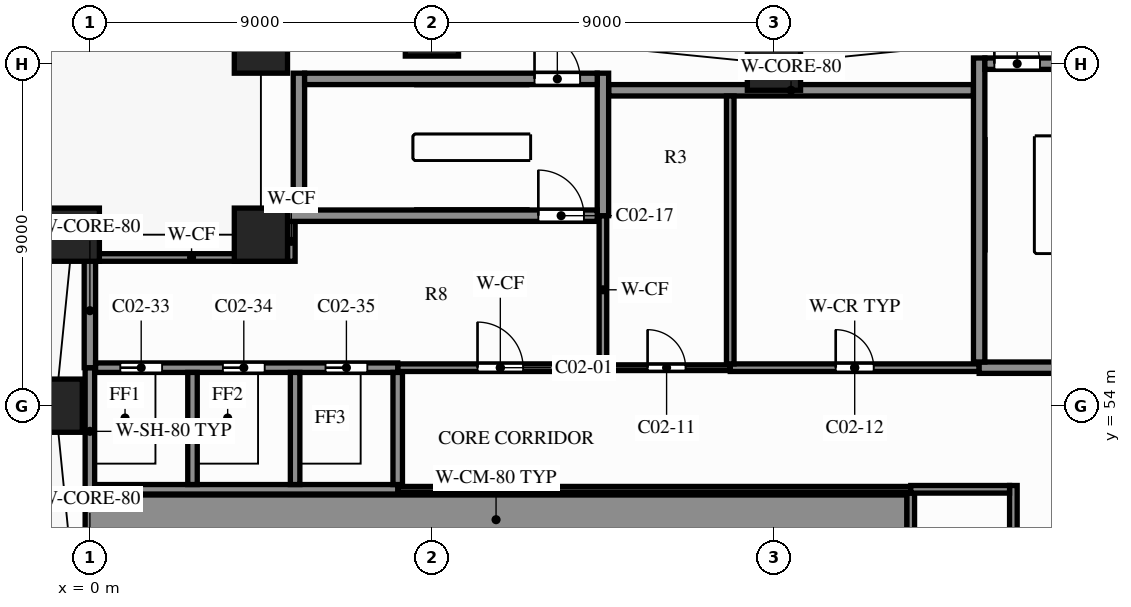
"""IFC4 building model, lengths in metres.
Left out: names, types, materials, properties, quantities, classifications, styles, units other than length and angle.
Written with IfcOpenShell. Run it as: python <this file> out.ifc"""

import sys

from ifc_helpers import new_model, si_unit, direction, frame, frame_2d, origin, origin_2d, place, context, subcontext, project, spatial, rectangle, extrude, element, fill, save


model = new_model("IFC4")
c1 = context("Model", 3, precision=1e-05, world=origin(), true_north=direction((0.0, 1.0)))
c2 = subcontext(c1, "Body", "Model", "MODEL_VIEW")
j1 = project(units=[si_unit("LENGTHUNIT", "METRE"), si_unit("PLANEANGLEUNIT", "RADIAN")], contexts=[c1])
p1 = place(None, origin())
s1 = spatial("IfcSite", under=j1, at=p1, CompositionType="ELEMENT")
p2 = place(p1, origin())
s2 = spatial("IfcBuilding", under=s1, at=p2, CompositionType="ELEMENT")
p3 = place(p2, origin())
s3 = spatial("IfcBuildingStorey", under=s2, at=p3, CompositionType="ELEMENT", Elevation=0.0)
for number, where, z_axis, x_axis in (
    (1, (18.0, 63.0, 0.0), (0.0, 0.0, 1.0), (1.0, 0.0, 0.0)),
    (2, (9.0, 63.9, 0.0), (0.0, 0.0, 1.0), (1.0, 0.0, 0.0)),
    (3, (4.5, 63.45, 0.0), (0.0, 0.0, 1.0), (1.0, 0.0, 0.0)),
    (4, (-0.45, 58.5, 0.0), (0.0, 0.0, 1.0), (1.0, 0.0, 0.0)),
    (5, (-0.9, 54.0, 0.0), (0.0, 0.0, 1.0), (1.0, 0.0, 0.0)),
    (6, (4.5, 58.5, 0.0), (0.0, 0.0, 1.0), (1.0, 0.0, 0.0)),
):
    element("IfcColumn", number, at=place(p3, frame(where, z_axis=z_axis, x_axis=x_axis)), inside=s3, PredefinedType="COLUMN", context=c2, shape_type="SweptSolid", body=[
        extrude(rectangle(XDim=1.4, YDim=1.4, at=origin_2d()), origin(), (0.0, 0.0, 1.0), 7.5),
    ])
p4 = place(p3, frame((-0.125, 51.0, 0.0), z_axis=(0.0, 0.0, 1.0), x_axis=(1.0, 0.0, 0.0)))
e7 = element("IfcWall", 7, at=p4, inside=s3, PredefinedType="SHEAR", context=c2, shape_type="SweptSolid", body=[
    extrude(rectangle(XDim=21.625, YDim=1.3, at=frame_2d((10.812, 0.0))), origin(), (0.0, 0.0, 1.0), 7.2),
])
p5 = place(p3, frame((8.1, 51.8, 0.0), z_axis=(0.0, 0.0, 1.0), x_axis=(1.0, 0.0, 0.0)))
e8 = element("IfcWall", 8, at=p5, inside=s3, PredefinedType="PARTITIONING", context=c2, shape_type="SweptSolid", body=[
    extrude(rectangle(XDim=13.5, YDim=0.15, at=frame_2d((6.75, 0.0))), origin(), (0.0, 0.0, 1.0), 7.2),
])
p6 = place(p3, frame((21.6, 51.8, 0.0), z_axis=(0.0, 0.0, 1.0), x_axis=(1.0, 0.0, 0.0)))
e9 = element("IfcWall", 9, at=p6, inside=s3, PredefinedType="PARTITIONING", context=c2, shape_type="SweptSolid", body=[
    extrude(rectangle(XDim=2.6, YDim=0.2, at=frame_2d((1.3, 0.0))), origin(), (0.0, 0.0, 1.0), 7.2),
])
p7 = place(p3, frame((0.125, 51.8, 0.0), z_axis=(0.0, 0.0, 1.0), x_axis=(1.0, 0.0, 0.0)))
e10 = element("IfcWall", 10, at=p7, inside=s3, PredefinedType="SHEAR", context=c2, shape_type="SweptSolid", body=[
    extrude(rectangle(XDim=7.975, YDim=0.25, at=frame_2d((3.988, 0.0))), origin(), (0.0, 0.0, 1.0), 7.2),
])
p8 = place(p3, frame((8.1, 55.0, 0.0), z_axis=(0.0, 0.0, 1.0), x_axis=(1.0, 0.0, 0.0)))
e11 = element("IfcWall", 11, at=p8, inside=s3, PredefinedType="PARTITIONING", context=c2, shape_type="SweptSolid", body=[
    extrude(rectangle(XDim=5.4, YDim=0.2, at=frame_2d((2.7, 0.0))), origin(), (0.0, 0.0, 1.0), 7.2),
])
p9 = place(p8, frame((2.1, 0.0, 0.0)))
e12 = element("IfcOpeningElement", 12, at=p9, cuts=e11, PredefinedType="OPENING", context=c2, shape_type="SweptSolid", body=[
    extrude(rectangle(XDim=1.2, YDim=2.2, at=frame_2d((0.6, 1.1))), frame((0.0, 0.11, 0.0), z_axis=(0.0, -1.0, 0.0), x_axis=(1.0, 0.0, 0.0)), (0.0, 0.0, 1.0), 0.22),
])
p10 = place(p3, frame((13.5, 55.0, 0.0), z_axis=(0.0, 0.0, 1.0), x_axis=(1.0, 0.0, 0.0)))
e13 = element("IfcWall", 13, at=p10, inside=s3, PredefinedType="PARTITIONING", context=c2, shape_type="SweptSolid", body=[
    extrude(rectangle(XDim=3.35, YDim=0.15, at=frame_2d((1.675, 0.0))), origin(), (0.0, 0.0, 1.0), 7.2),
])
p11 = place(p10, frame((1.175, 0.0, 0.0)))
e14 = element("IfcOpeningElement", 14, at=p11, cuts=e13, PredefinedType="OPENING", context=c2, shape_type="SweptSolid", body=[
    extrude(rectangle(XDim=1.0, YDim=2.1, at=frame_2d((0.5, 1.05))), frame((0.0, 0.085, 0.0), z_axis=(0.0, -1.0, 0.0), x_axis=(1.0, 0.0, 0.0)), (0.0, 0.0, 1.0), 0.17),
])
p12 = place(p3, frame((16.85, 55.0, 0.0), z_axis=(0.0, 0.0, 1.0), x_axis=(1.0, 0.0, 0.0)))
e15 = element("IfcWall", 15, at=p12, inside=s3, PredefinedType="PARTITIONING", context=c2, shape_type="SweptSolid", body=[
    extrude(rectangle(XDim=6.55, YDim=0.2, at=frame_2d((3.275, 0.0))), origin(), (0.0, 0.0, 1.0), 7.2),
])
p13 = place(p12, frame((2.775, 0.0, 0.0)))
e16 = element("IfcOpeningElement", 16, at=p13, cuts=e15, PredefinedType="OPENING", context=c2, shape_type="SweptSolid", body=[
    extrude(rectangle(XDim=1.0, YDim=2.1, at=frame_2d((0.5, 1.05))), frame((0.0, 0.11, 0.0), z_axis=(0.0, -1.0, 0.0), x_axis=(1.0, 0.0, 0.0)), (0.0, 0.0, 1.0), 0.22),
])
p14 = place(p3, frame((0.15, 55.0, 0.0), z_axis=(0.0, 0.0, 1.0), x_axis=(1.0, 0.0, 0.0)))
e17 = element("IfcWall", 17, at=p14, inside=s3, PredefinedType="SHEAR", context=c2, shape_type="SweptSolid", body=[
    extrude(rectangle(XDim=7.95, YDim=0.25, at=frame_2d((3.975, 0.0))), origin(), (0.0, 0.0, 1.0), 7.2),
])
p15 = place(p14, frame((0.65, 0.0, 0.0)))
e18 = element("IfcOpeningElement", 18, at=p15, cuts=e17, PredefinedType="OPENING", context=c2, shape_type="SweptSolid", body=[
    extrude(rectangle(XDim=1.1, YDim=2.1, at=frame_2d((0.55, 1.05))), frame((0.0, 0.135, 0.0), z_axis=(0.0, -1.0, 0.0), x_axis=(1.0, 0.0, 0.0)), (0.0, 0.0, 1.0), 0.27),
])
p16 = place(p14, frame((3.35, 0.0, 0.0)))
e19 = element("IfcOpeningElement", 19, at=p16, cuts=e17, PredefinedType="OPENING", context=c2, shape_type="SweptSolid", body=[
    extrude(rectangle(XDim=1.1, YDim=2.1, at=frame_2d((0.55, 1.05))), frame((0.0, 0.135, 0.0), z_axis=(0.0, -1.0, 0.0), x_axis=(1.0, 0.0, 0.0)), (0.0, 0.0, 1.0), 0.27),
])
p17 = place(p14, frame((6.05, 0.0, 0.0)))
e20 = element("IfcOpeningElement", 20, at=p17, cuts=e17, PredefinedType="OPENING", context=c2, shape_type="SweptSolid", body=[
    extrude(rectangle(XDim=1.1, YDim=2.1, at=frame_2d((0.55, 1.05))), frame((0.0, 0.135, 0.0), z_axis=(0.0, -1.0, 0.0), x_axis=(1.0, 0.0, 0.0)), (0.0, 0.0, 1.0), 0.27),
])
p18 = place(p3, frame((23.4, 55.0, 0.0), z_axis=(0.0, 0.0, 1.0), x_axis=(1.0, 0.0, 0.0)))
e21 = element("IfcWall", 21, at=p18, inside=s3, PredefinedType="SHEAR", context=c2, shape_type="SweptSolid", body=[
    extrude(rectangle(XDim=3.45, YDim=0.3, at=frame_2d((1.725, 0.0))), origin(), (0.0, 0.0, 1.0), 7.2),
])
p19 = place(p3, frame((0.15, 57.9, 0.0), z_axis=(0.0, 0.0, 1.0), x_axis=(1.0, 0.0, 0.0)))
e22 = element("IfcWall", 22, at=p19, inside=s3, PredefinedType="PARTITIONING", context=c2, shape_type="SweptSolid", body=[
    extrude(rectangle(XDim=5.05, YDim=0.2, at=frame_2d((2.525, 0.0))), origin(), (0.0, 0.0, 1.0), 7.2),
])
p20 = place(p3, frame((5.2, 59.0, 0.0), z_axis=(0.0, 0.0, 1.0), x_axis=(1.0, 0.0, 0.0)))
e23 = element("IfcWall", 23, at=p20, inside=s3, PredefinedType="SHEAR", context=c2, shape_type="SweptSolid", body=[
    extrude(rectangle(XDim=8.15, YDim=0.3, at=frame_2d((4.075, 0.0))), origin(), (0.0, 0.0, 1.0), 7.2),
])
p21 = place(p20, frame((6.6, 0.0, 0.0)))
e24 = element("IfcOpeningElement", 24, at=p21, cuts=e23, PredefinedType="OPENING", context=c2, shape_type="SweptSolid", body=[
    extrude(rectangle(XDim=1.2, YDim=2.2, at=frame_2d((0.6, 1.1))), frame((0.0, 0.16, 0.0), z_axis=(0.0, -1.0, 0.0), x_axis=(1.0, 0.0, 0.0)), (0.0, 0.0, 1.0), 0.32),
])
p22 = place(p3, frame((13.65, 62.3, 0.0), z_axis=(0.0, 0.0, 1.0), x_axis=(1.0, 0.0, 0.0)))
e25 = element("IfcWall", 25, at=p22, inside=s3, PredefinedType="SHEAR", context=c2, shape_type="SweptSolid", body=[
    extrude(rectangle(XDim=9.6, YDim=0.3, at=frame_2d((4.8, 0.0))), origin(), (0.0, 0.0, 1.0), 7.2),
])
p23 = place(p3, frame((5.65, 62.6, 0.0), z_axis=(0.0, 0.0, 1.0), x_axis=(1.0, 0.0, 0.0)))
e26 = element("IfcWall", 26, at=p23, inside=s3, PredefinedType="SHEAR", context=c2, shape_type="SweptSolid", body=[
    extrude(rectangle(XDim=7.7, YDim=0.3, at=frame_2d((3.85, 0.0))), origin(), (0.0, 0.0, 1.0), 7.2),
])
p24 = place(p23, frame((6.05, 0.0, 0.0)))
e27 = element("IfcOpeningElement", 27, at=p24, cuts=e26, PredefinedType="OPENING", context=c2, shape_type="SweptSolid", body=[
    extrude(rectangle(XDim=1.2, YDim=2.2, at=frame_2d((0.6, 1.1))), frame((0.0, 0.16, 0.0), z_axis=(0.0, -1.0, 0.0), x_axis=(1.0, 0.0, 0.0)), (0.0, 0.0, 1.0), 0.32),
])
p25 = place(p3, frame((23.55, 63.0, 0.0), z_axis=(0.0, 0.0, 1.0), x_axis=(1.0, 0.0, 0.0)))
e28 = element("IfcWall", 28, at=p25, inside=s3, PredefinedType="SHEAR", context=c2, shape_type="SweptSolid", body=[
    extrude(rectangle(XDim=3.3, YDim=0.3, at=frame_2d((1.65, 0.0))), origin(), (0.0, 0.0, 1.0), 7.2),
])
p26 = place(p25, frame((0.25, 0.0, 0.0)))
e29 = element("IfcOpeningElement", 29, at=p26, cuts=e28, PredefinedType="OPENING", context=c2, shape_type="SweptSolid", body=[
    extrude(rectangle(XDim=1.2, YDim=2.2, at=frame_2d((0.6, 1.1))), frame((0.0, 0.16, 0.0), z_axis=(0.0, -1.0, 0.0), x_axis=(1.0, 0.0, 0.0)), (0.0, 0.0, 1.0), 0.32),
])
p27 = place(p3, frame((0.0, 55.0, 0.0), z_axis=(0.0, 0.0, 1.0), x_axis=(0.0, 1.0, 0.0)))
e30 = element("IfcWall", 30, at=p27, inside=s3, PredefinedType="SHEAR", context=c2, shape_type="SweptSolid", body=[
    extrude(rectangle(XDim=3.0, YDim=0.3, at=frame_2d((1.5, 0.0))), origin(), (0.0, 0.0, 1.0), 7.2),
])
p28 = place(p3, frame((0.0, 51.65, 0.0), z_axis=(0.0, 0.0, 1.0), x_axis=(0.0, 1.0, 0.0)))
e31 = element("IfcWall", 31, at=p28, inside=s3, PredefinedType="SHEAR", context=c2, shape_type="SweptSolid", body=[
    extrude(rectangle(XDim=3.35, YDim=0.25, at=frame_2d((1.675, 0.0))), origin(), (0.0, 0.0, 1.0), 7.2),
])
p29 = place(p3, frame((2.7, 51.925, 0.0), z_axis=(0.0, 0.0, 1.0), x_axis=(0.0, 1.0, 0.0)))
e32 = element("IfcWall", 32, at=p29, inside=s3, PredefinedType="SHEAR", context=c2, shape_type="SweptSolid", body=[
    extrude(rectangle(XDim=2.95, YDim=0.25, at=frame_2d((1.475, 0.0))), origin(), (0.0, 0.0, 1.0), 7.2),
])
p30 = place(p3, frame((5.3, 57.8, 0.0), z_axis=(0.0, 0.0, 1.0), x_axis=(0.0, 1.0, 0.0)))
e33 = element("IfcWall", 33, at=p30, inside=s3, PredefinedType="PARTITIONING", context=c2, shape_type="SweptSolid", body=[
    extrude(rectangle(XDim=1.05, YDim=0.2, at=frame_2d((0.525, 0.0))), origin(), (0.0, 0.0, 1.0), 7.2),
])
p31 = place(p3, frame((5.4, 51.925, 0.0), z_axis=(0.0, 0.0, 1.0), x_axis=(0.0, 1.0, 0.0)))
e34 = element("IfcWall", 34, at=p31, inside=s3, PredefinedType="SHEAR", context=c2, shape_type="SweptSolid", body=[
    extrude(rectangle(XDim=2.95, YDim=0.25, at=frame_2d((1.475, 0.0))), origin(), (0.0, 0.0, 1.0), 7.2),
])
p32 = place(p3, frame((5.5, 59.15, 0.0), z_axis=(0.0, 0.0, 1.0), x_axis=(0.0, 1.0, 0.0)))
e35 = element("IfcWall", 35, at=p32, inside=s3, PredefinedType="SHEAR", context=c2, shape_type="SweptSolid", body=[
    extrude(rectangle(XDim=3.6, YDim=0.3, at=frame_2d((1.8, 0.0))), origin(), (0.0, 0.0, 1.0), 7.2),
])
p33 = place(p3, frame((8.1, 51.925, 0.0), z_axis=(0.0, 0.0, 1.0), x_axis=(0.0, 1.0, 0.0)))
e36 = element("IfcWall", 36, at=p33, inside=s3, PredefinedType="SHEAR", context=c2, shape_type="SweptSolid", body=[
    extrude(rectangle(XDim=2.95, YDim=0.25, at=frame_2d((1.475, 0.0))), origin(), (0.0, 0.0, 1.0), 7.2),
])
p34 = place(p3, frame((13.5, 55.1, 0.0), z_axis=(0.0, 0.0, 1.0), x_axis=(0.0, 1.0, 0.0)))
e37 = element("IfcWall", 37, at=p34, inside=s3, PredefinedType="PARTITIONING", context=c2, shape_type="SweptSolid", body=[
    extrude(rectangle(XDim=3.9, YDim=0.2, at=frame_2d((1.95, 0.0))), origin(), (0.0, 0.0, 1.0), 7.2),
])
p35 = place(p3, frame((13.5, 59.0, 0.0), z_axis=(0.0, 0.0, 1.0), x_axis=(0.0, 1.0, 0.0)))
e38 = element("IfcWall", 38, at=p35, inside=s3, PredefinedType="SHEAR", context=c2, shape_type="SweptSolid", body=[
    extrude(rectangle(XDim=3.75, YDim=0.3, at=frame_2d((1.875, 0.0))), origin(), (0.0, 0.0, 1.0), 7.2),
])
p36 = place(p3, frame((16.85, 55.1, 0.0), z_axis=(0.0, 0.0, 1.0), x_axis=(0.0, 1.0, 0.0)))
e39 = element("IfcWall", 39, at=p36, inside=s3, PredefinedType="PARTITIONING", context=c2, shape_type="SweptSolid", body=[
    extrude(rectangle(XDim=7.05, YDim=0.2, at=frame_2d((3.525, 0.0))), origin(), (0.0, 0.0, 1.0), 7.2),
])
p37 = place(p3, frame((21.6, 50.2, 0.0), z_axis=(0.0, 0.0, 1.0), x_axis=(0.0, 1.0, 0.0)))
e40 = element("IfcWall", 40, at=p37, inside=s3, PredefinedType="PARTITIONING", context=c2, shape_type="SweptSolid", body=[
    extrude(rectangle(XDim=1.5, YDim=0.2, at=frame_2d((0.75, 0.0))), origin(), (0.0, 0.0, 1.0), 7.2),
])
p38 = place(p3, frame((23.4, 55.15, 0.0), z_axis=(0.0, 0.0, 1.0), x_axis=(0.0, 1.0, 0.0)))
e41 = element("IfcWall", 41, at=p38, inside=s3, PredefinedType="SHEAR", context=c2, shape_type="SweptSolid", body=[
    extrude(rectangle(XDim=8.0, YDim=0.3, at=frame_2d((4.0, 0.0))), origin(), (0.0, 0.0, 1.0), 7.2),
])
p39 = place(p3, frame((24.3, 46.9, 0.0), z_axis=(0.0, 0.0, 1.0), x_axis=(0.0, 1.0, 0.0)))
e42 = element("IfcWall", 42, at=p39, inside=s3, PredefinedType="SHEAR", context=c2, shape_type="SweptSolid", body=[
    extrude(rectangle(XDim=5.0, YDim=0.2, at=frame_2d((2.5, 0.0))), origin(), (0.0, 0.0, 1.0), 7.2),
])
p40 = place(p9, origin())
e43 = element("IfcDoor", 43, at=p40, inside=s3, OperationType="SINGLE_SWING_RIGHT", PredefinedType="DOOR", context=c2, shape_type="SweptSolid", body=[
    extrude(rectangle(XDim=1.2, YDim=2.2, at=frame_2d((0.6, 1.1))), frame((0.0, 0.025, 0.0), z_axis=(0.0, -1.0, 0.0), x_axis=(1.0, 0.0, 0.0)), (0.0, 0.0, 1.0), 0.05),
])
fill(e12, e43)
p41 = place(p11, origin())
e44 = element("IfcDoor", 44, at=p41, inside=s3, OperationType="SINGLE_SWING_LEFT", PredefinedType="DOOR", context=c2, shape_type="SweptSolid", body=[
    extrude(rectangle(XDim=1.0, YDim=2.1, at=frame_2d((0.5, 1.05))), frame((0.0, 0.025, 0.0), z_axis=(0.0, -1.0, 0.0), x_axis=(1.0, 0.0, 0.0)), (0.0, 0.0, 1.0), 0.05),
])
fill(e14, e44)
p42 = place(p13, origin())
e45 = element("IfcDoor", 45, at=p42, inside=s3, OperationType="SINGLE_SWING_RIGHT", PredefinedType="DOOR", context=c2, shape_type="SweptSolid", body=[
    extrude(rectangle(XDim=1.0, YDim=2.1, at=frame_2d((0.5, 1.05))), frame((0.0, 0.025, 0.0), z_axis=(0.0, -1.0, 0.0), x_axis=(1.0, 0.0, 0.0)), (0.0, 0.0, 1.0), 0.05),
])
fill(e16, e45)
p43 = place(p21, origin())
e46 = element("IfcDoor", 46, at=p43, inside=s3, OperationType="SINGLE_SWING_RIGHT", PredefinedType="DOOR", context=c2, shape_type="SweptSolid", body=[
    extrude(rectangle(XDim=1.2, YDim=2.2, at=frame_2d((0.6, 1.1))), frame((0.0, 0.025, 0.0), z_axis=(0.0, -1.0, 0.0), x_axis=(1.0, 0.0, 0.0)), (0.0, 0.0, 1.0), 0.05),
])
fill(e24, e46)
p44 = place(p26, origin())
e47 = element("IfcDoor", 47, at=p44, inside=s3, OperationType="SINGLE_SWING_RIGHT", PredefinedType="DOOR", context=c2, shape_type="SweptSolid", body=[
    extrude(rectangle(XDim=1.2, YDim=2.2, at=frame_2d((0.6, 1.1))), frame((0.0, 0.025, 0.0), z_axis=(0.0, -1.0, 0.0), x_axis=(1.0, 0.0, 0.0)), (0.0, 0.0, 1.0), 0.05),
])
fill(e29, e47)
p45 = place(p24, origin())
e48 = element("IfcDoor", 48, at=p45, inside=s3, OperationType="SINGLE_SWING_LEFT", PredefinedType="DOOR", context=c2, shape_type="SweptSolid", body=[
    extrude(rectangle(XDim=1.2, YDim=2.2, at=frame_2d((0.6, 1.1))), frame((0.0, 0.025, 0.0), z_axis=(0.0, -1.0, 0.0), x_axis=(1.0, 0.0, 0.0)), (0.0, 0.0, 1.0), 0.05),
])
fill(e27, e48)
p46 = place(p15, origin())
e49 = element("IfcDoor", 49, at=p46, inside=s3, OperationType="DOUBLE_DOOR_SLIDING", PredefinedType="DOOR", context=c2, shape_type="SweptSolid", body=[
    extrude(rectangle(XDim=1.1, YDim=2.1, at=frame_2d((0.55, 1.05))), frame((0.0, 0.025, 0.0), z_axis=(0.0, -1.0, 0.0), x_axis=(1.0, 0.0, 0.0)), (0.0, 0.0, 1.0), 0.05),
])
fill(e18, e49)
p47 = place(p16, origin())
e50 = element("IfcDoor", 50, at=p47, inside=s3, OperationType="DOUBLE_DOOR_SLIDING", PredefinedType="DOOR", context=c2, shape_type="SweptSolid", body=[
    extrude(rectangle(XDim=1.1, YDim=2.1, at=frame_2d((0.55, 1.05))), frame((0.0, 0.025, 0.0), z_axis=(0.0, -1.0, 0.0), x_axis=(1.0, 0.0, 0.0)), (0.0, 0.0, 1.0), 0.05),
])
fill(e19, e50)
p48 = place(p17, origin())
e51 = element("IfcDoor", 51, at=p48, inside=s3, OperationType="DOUBLE_DOOR_SLIDING", PredefinedType="DOOR", context=c2, shape_type="SweptSolid", body=[
    extrude(rectangle(XDim=1.1, YDim=2.1, at=frame_2d((0.55, 1.05))), frame((0.0, 0.025, 0.0), z_axis=(0.0, -1.0, 0.0), x_axis=(1.0, 0.0, 0.0)), (0.0, 0.0, 1.0), 0.05),
])
fill(e20, e51)
save(model, sys.argv[1])
